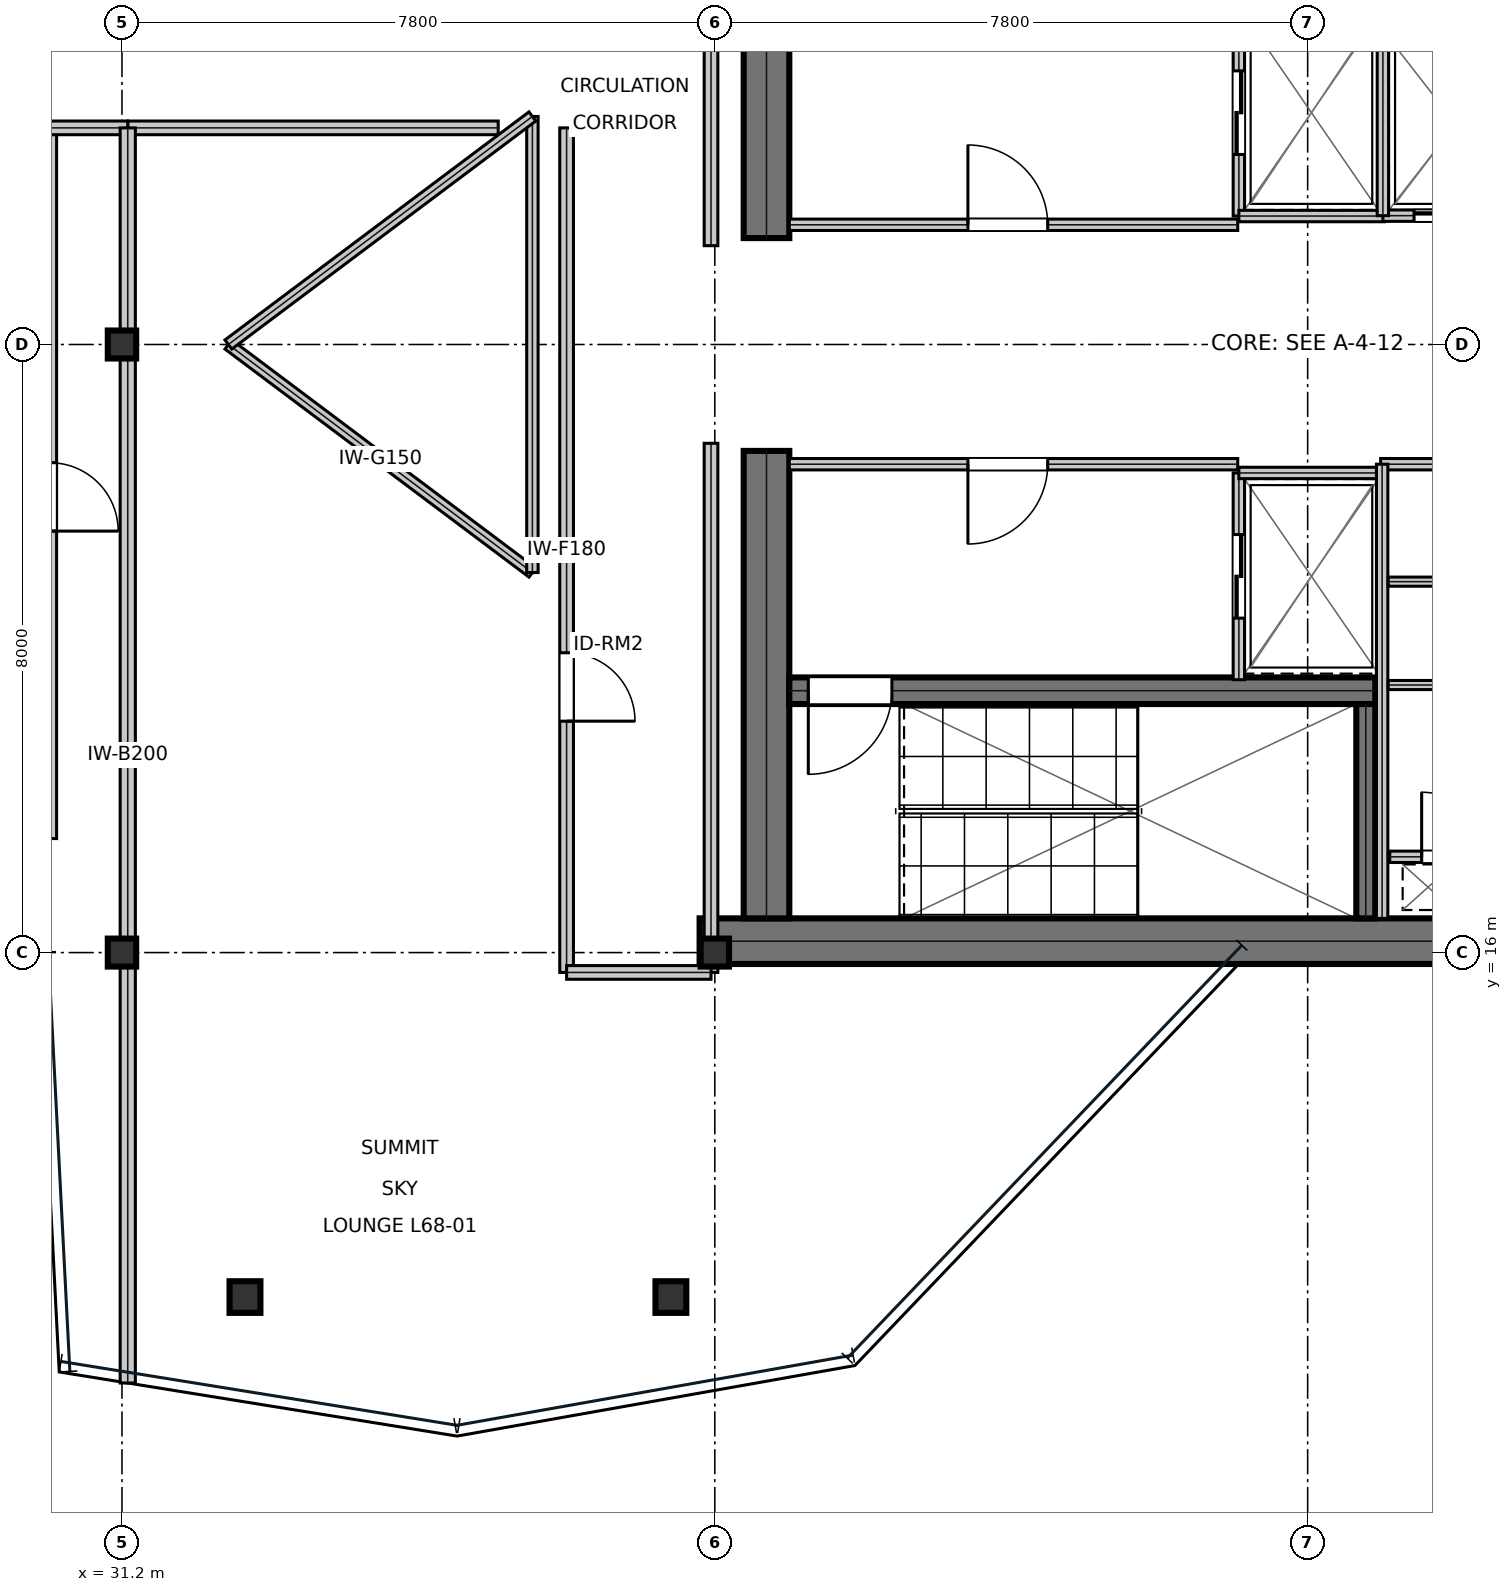
"""IFC4 building model, lengths in metres.
Left out: names, types, materials, properties, quantities, classifications, styles, units other than length and angle.
Written with IfcOpenShell. Run it as: python <this file> out.ifc"""

import sys

from ifc_helpers import new_model, si_unit, direction, frame, frame_2d, origin, origin_2d, place, context, subcontext, project, spatial, rectangle, i_section, extrude, element, fill, save


model = new_model("IFC4")
c1 = context("Model", 3, precision=1e-05, world=origin(), true_north=direction((0.0, 1.0)))
c2 = subcontext(c1, "Body", "Model", "MODEL_VIEW")
j1 = project(units=[si_unit("LENGTHUNIT", "METRE"), si_unit("PLANEANGLEUNIT", "RADIAN")], contexts=[c1])
p1 = place(None, origin())
s1 = spatial("IfcSite", under=j1, at=p1, CompositionType="ELEMENT")
p2 = place(p1, origin())
s2 = spatial("IfcBuilding", under=s1, at=p2, CompositionType="ELEMENT")
p3 = place(p2, frame((0.0, 0.0, 291.15)))
s3 = spatial("IfcBuildingStorey", under=s2, at=p3, CompositionType="ELEMENT", Elevation=291.15)
p4 = place(p3, frame((38.8, 16.15, 0.0), z_axis=(0.0, 0.0, 1.0), x_axis=(1.0, 0.0, 0.0)))
e1 = element("IfcWall", 1, at=p4, inside=s3, PredefinedType="SHEAR", context=c2, shape_type="SweptSolid", body=[
    extrude(rectangle(XDim=16.0, YDim=0.6, at=frame_2d((8.0, 0.0))), origin(), (0.0, 0.0, 1.0), 3.81),
])
for number, where, z_axis, x_axis in (
    (2, (39.68, 16.45, 0.0), (0.0, 0.0, 1.0), (0.0, 1.0, 0.0)),
    (3, (39.68, 25.4, 0.0), (0.0, 0.0, 1.0), (0.0, 1.0, 0.0)),
):
    element("IfcWall", number, at=place(p3, frame(where, z_axis=z_axis, x_axis=x_axis)), inside=s3, PredefinedType="SHEAR", context=c2, shape_type="SweptSolid", body=[
        extrude(rectangle(XDim=6.15, YDim=0.6, at=frame_2d((3.075, 0.0))), origin(), (0.0, 0.0, 1.0), 3.81),
    ])
p5 = place(p3, frame((39.98, 19.445, 0.0), z_axis=(0.0, 0.0, 1.0), x_axis=(1.0, 0.0, 0.0)))
e4 = element("IfcWall", 4, at=p5, inside=s3, PredefinedType="SHEAR", context=c2, shape_type="SweptSolid", body=[
    extrude(rectangle(XDim=7.71, YDim=0.35, at=frame_2d((3.855, 0.0))), origin(), (0.0, 0.0, 1.0), 3.81),
])
p6 = place(p5, frame((0.25, 0.0, 0.0)))
e5 = element("IfcOpeningElement", 5, at=p6, cuts=e4, PredefinedType="OPENING", context=c2, shape_type="SweptSolid", body=[
    extrude(rectangle(XDim=1.1, YDim=2.15, at=frame_2d((0.55, 1.075))), frame((0.0, 0.185, 0.0), z_axis=(0.0, -1.0, 0.0), x_axis=(1.0, 0.0, 0.0)), (0.0, 0.0, 1.0), 0.37),
])
p7 = place(p3, frame((47.565, 16.45, 0.0), z_axis=(0.0, 0.0, 1.0), x_axis=(0.0, 1.0, 0.0)))
e6 = element("IfcWall", 6, at=p7, inside=s3, PredefinedType="SHEAR", context=c2, shape_type="SweptSolid", body=[
    extrude(rectangle(XDim=2.82, YDim=0.25, at=frame_2d((1.41, 0.0))), origin(), (0.0, 0.0, 1.0), 3.81),
])
for number, where, z_axis, x_axis in (
    (7, (31.2, 16.0, 0.0), (0.0, 0.0, 1.0), (1.0, 0.0, 0.0)),
    (8, (31.2, 24.0, 0.0), (0.0, 0.0, 1.0), (1.0, 0.0, 0.0)),
    (9, (39.0, 16.0, 0.0), (0.0, 0.0, 1.0), (1.0, 0.0, 0.0)),
):
    element("IfcColumn", number, at=place(p3, frame(where, z_axis=z_axis, x_axis=x_axis)), inside=s3, PredefinedType="COLUMN", context=c2, shape_type="SweptSolid", body=[
        extrude(i_section(OverallWidth=0.373, OverallDepth=0.368, WebThickness=0.015, FlangeThickness=0.024, at=origin_2d()), origin(), (0.0, 0.0, 1.0), 4.044),
    ])
for number, where, z_axis, x_axis in (
    (10, (32.818, 11.468, 0.016), (0.0, 0.0, 1.0), (1.0, 0.0, 0.0)),
    (11, (38.422, 11.468, 0.016), (0.0, 0.0, 1.0), (1.0, 0.0, 0.0)),
):
    element("IfcColumn", number, at=place(p3, frame(where, z_axis=z_axis, x_axis=x_axis)), inside=s3, PredefinedType="COLUMN", context=c2, shape_type="SweptSolid", body=[
        extrude(i_section(OverallWidth=0.406, OverallDepth=0.416, WebThickness=0.03, FlangeThickness=0.048, at=origin_2d()), origin(), (0.0, 0.0, 1.0), 4.018),
    ])
p8 = place(p3, frame((39.98, 25.575, 0.0), z_axis=(0.0, 0.0, 1.0), x_axis=(1.0, 0.0, 0.0)))
e12 = element("IfcWall", 12, at=p8, inside=s3, PredefinedType="PARTITIONING", context=c2, shape_type="SweptSolid", body=[
    extrude(rectangle(XDim=5.9, YDim=0.15, at=frame_2d((2.95, 0.0))), origin(), (0.0, 0.0, 1.0), 3.81),
])
p9 = place(p8, frame((2.35, 0.0, 0.0)))
e13 = element("IfcOpeningElement", 13, at=p9, cuts=e12, PredefinedType="OPENING", context=c2, shape_type="SweptSolid", body=[
    extrude(rectangle(XDim=1.05, YDim=2.15, at=frame_2d((0.525, 1.075))), frame((0.0, 0.085, 0.0), z_axis=(0.0, -1.0, 0.0), x_axis=(1.0, 0.0, 0.0)), (0.0, 0.0, 1.0), 0.17),
])
p10 = place(p3, frame((39.98, 22.425, 0.0), z_axis=(0.0, 0.0, 1.0), x_axis=(1.0, 0.0, 0.0)))
e14 = element("IfcWall", 14, at=p10, inside=s3, PredefinedType="PARTITIONING", context=c2, shape_type="SweptSolid", body=[
    extrude(rectangle(XDim=5.9, YDim=0.15, at=frame_2d((2.95, 0.0))), origin(), (0.0, 0.0, 1.0), 3.81),
])
p11 = place(p10, frame((2.35, 0.0, 0.0)))
e15 = element("IfcOpeningElement", 15, at=p11, cuts=e14, PredefinedType="OPENING", context=c2, shape_type="SweptSolid", body=[
    extrude(rectangle(XDim=1.05, YDim=2.15, at=frame_2d((0.525, 1.075))), frame((0.0, 0.085, 0.0), z_axis=(0.0, -1.0, 0.0), x_axis=(1.0, 0.0, 0.0)), (0.0, 0.0, 1.0), 0.17),
])
p12 = place(p3, frame((45.895, 25.69, 0.0), z_axis=(0.0, 0.0, 1.0), x_axis=(0.0, 1.0, 0.0)))
e16 = element("IfcWall", 16, at=p12, inside=s3, PredefinedType="PARTITIONING", context=c2, shape_type="SweptSolid", body=[
    extrude(rectangle(XDim=2.72, YDim=0.15, at=frame_2d((1.36, 0.0))), origin(), (0.0, 0.0, 1.0), 3.81),
])
p13 = place(p12, frame((0.81, 0.0, 0.0)))
e17 = element("IfcOpeningElement", 17, at=p13, cuts=e16, PredefinedType="OPENING", context=c2, shape_type="SweptSolid", body=[
    extrude(rectangle(XDim=1.1, YDim=2.15, at=frame_2d((0.55, 1.075))), frame((0.0, 0.085, 0.0), z_axis=(0.0, -1.0, 0.0), x_axis=(1.0, 0.0, 0.0)), (0.0, 0.0, 1.0), 0.17),
])
p14 = place(p3, frame((45.895, 25.69, 0.0), z_axis=(0.0, 0.0, 1.0), x_axis=(1.0, 0.0, 0.0)))
e18 = element("IfcWall", 18, at=p14, inside=s3, PredefinedType="PARTITIONING", context=c2, shape_type="SweptSolid", body=[
    extrude(rectangle(XDim=1.915, YDim=0.15, at=frame_2d((0.958, 0.0))), origin(), (0.0, 0.0, 1.0), 3.81),
])
p15 = place(p3, frame((45.895, 19.59, 0.0), z_axis=(0.0, 0.0, 1.0), x_axis=(0.0, 1.0, 0.0)))
e19 = element("IfcWall", 19, at=p15, inside=s3, PredefinedType="PARTITIONING", context=c2, shape_type="SweptSolid", body=[
    extrude(rectangle(XDim=2.72, YDim=0.15, at=frame_2d((1.36, 0.0))), origin(), (0.0, 0.0, 1.0), 3.81),
])
p16 = place(p15, frame((0.81, 0.0, 0.0)))
e20 = element("IfcOpeningElement", 20, at=p16, cuts=e19, PredefinedType="OPENING", context=c2, shape_type="SweptSolid", body=[
    extrude(rectangle(XDim=1.1, YDim=2.15, at=frame_2d((0.55, 1.075))), frame((0.0, 0.085, 0.0), z_axis=(0.0, -1.0, 0.0), x_axis=(1.0, 0.0, 0.0)), (0.0, 0.0, 1.0), 0.17),
])
p17 = place(p3, frame((45.895, 22.31, 0.0), z_axis=(0.0, 0.0, 1.0), x_axis=(1.0, 0.0, 0.0)))
e21 = element("IfcWall", 21, at=p17, inside=s3, PredefinedType="PARTITIONING", context=c2, shape_type="SweptSolid", body=[
    extrude(rectangle(XDim=1.915, YDim=0.15, at=frame_2d((0.958, 0.0))), origin(), (0.0, 0.0, 1.0), 3.81),
])
p18 = place(p3, frame((47.79, 25.695, 0.0), z_axis=(0.0, 0.0, 1.0), x_axis=(1.0, 0.0, 0.0)))
e22 = element("IfcWall", 22, at=p18, inside=s3, PredefinedType="PARTITIONING", context=c2, shape_type="SweptSolid", body=[
    extrude(rectangle(XDim=1.92, YDim=0.15, at=frame_2d((0.96, 0.0))), origin(), (0.0, 0.0, 1.0), 3.81),
])
p19 = place(p18, frame((0.41, 0.0, 0.0)))
e23 = element("IfcOpeningElement", 23, at=p19, cuts=e22, PredefinedType="OPENING", context=c2, shape_type="SweptSolid", body=[
    extrude(rectangle(XDim=1.1, YDim=2.15, at=frame_2d((0.55, 1.075))), frame((0.0, 0.085, 0.0), z_axis=(0.0, -1.0, 0.0), x_axis=(1.0, 0.0, 0.0)), (0.0, 0.0, 1.0), 0.17),
])
p20 = place(p3, frame((47.79, 25.695, 0.0), z_axis=(0.0, 0.0, 1.0), x_axis=(0.0, 1.0, 0.0)))
e24 = element("IfcWall", 24, at=p20, inside=s3, PredefinedType="PARTITIONING", context=c2, shape_type="SweptSolid", body=[
    extrude(rectangle(XDim=2.415, YDim=0.15, at=frame_2d((1.208, 0.0))), origin(), (0.0, 0.0, 1.0), 3.81),
])
p21 = place(p3, frame((47.88, 17.26, 0.0), z_axis=(0.0, 0.0, 1.0), x_axis=(1.0, 0.0, 0.0)))
e25 = element("IfcWall", 25, at=p21, inside=s3, PredefinedType="PARTITIONING", context=c2, shape_type="SweptSolid", body=[
    extrude(rectangle(XDim=1.72, YDim=0.15, at=frame_2d((0.86, 0.0))), origin(), (0.0, 0.0, 1.0), 3.81),
])
p22 = place(p21, frame((0.42, 0.0, 0.0)))
e26 = element("IfcOpeningElement", 26, at=p22, cuts=e25, PredefinedType="OPENING", context=c2, shape_type="SweptSolid", body=[
    extrude(rectangle(XDim=0.85, YDim=2.15, at=frame_2d((0.425, 1.075))), frame((0.0, 0.085, 0.0), z_axis=(0.0, -1.0, 0.0), x_axis=(1.0, 0.0, 0.0)), (0.0, 0.0, 1.0), 0.17),
])
p23 = place(p3, frame((47.76, 22.425, 0.0), z_axis=(0.0, 0.0, 1.0), x_axis=(1.0, 0.0, 0.0)))
e27 = element("IfcWall", 27, at=p23, inside=s3, PredefinedType="PARTITIONING", context=c2, shape_type="SweptSolid", body=[
    extrude(rectangle(XDim=1.96, YDim=0.15, at=frame_2d((0.98, 0.0))), origin(), (0.0, 0.0, 1.0), 3.81),
])
p24 = place(p3, frame((47.78, 16.45, 0.0), z_axis=(0.0, 0.0, 1.0), x_axis=(0.0, 1.0, 0.0)))
e28 = element("IfcWall", 28, at=p24, inside=s3, PredefinedType="PARTITIONING", context=c2, shape_type="SweptSolid", body=[
    extrude(rectangle(XDim=5.975, YDim=0.15, at=frame_2d((2.988, 0.0))), origin(), (0.0, 0.0, 1.0), 3.81),
])
for number, where, z_axis, x_axis in (
    (29, (47.86, 19.52, 0.0), (0.0, 0.0, 1.0), (1.0, 0.0, 0.0)),
    (30, (47.86, 20.88, 0.0), (0.0, 0.0, 1.0), (1.0, 0.0, 0.0)),
):
    element("IfcWall", number, at=place(p3, frame(where, z_axis=z_axis, x_axis=x_axis)), inside=s3, PredefinedType="PARTITIONING", context=c2, shape_type="SweptSolid", body=[
        extrude(rectangle(XDim=1.76, YDim=0.12, at=frame_2d((0.88, 0.0))), origin(), (0.0, 0.0, 1.0), 3.81),
    ])
p25 = place(p3, frame((37.05, 15.739, 0.0), z_axis=(0.0, 0.0, 1.0), x_axis=(0.0, 1.0, 0.0)))
e31 = element("IfcWall", 31, at=p25, inside=s3, PredefinedType="SOLIDWALL", context=c2, shape_type="SweptSolid", body=[
    extrude(rectangle(XDim=11.111, YDim=0.18, at=frame_2d((5.556, 0.0))), origin(), (0.0, 0.0, 1.0), 3.27),
])
p26 = place(p25, frame((3.306, 0.0, 0.0)))
e32 = element("IfcOpeningElement", 32, at=p26, cuts=e31, PredefinedType="OPENING", context=c2, shape_type="SweptSolid", body=[
    extrude(rectangle(XDim=0.9, YDim=2.15, at=frame_2d((0.45, 1.075))), frame((0.0, 0.1, 0.0), z_axis=(0.0, -1.0, 0.0), x_axis=(1.0, 0.0, 0.0)), (0.0, 0.0, 1.0), 0.2),
])
p27 = place(p3, frame((30.25, 17.5, 0.0), z_axis=(0.0, 0.0, 1.0), x_axis=(0.0, 1.0, 0.0)))
e33 = element("IfcWall", 33, at=p27, inside=s3, PredefinedType="SOLIDWALL", context=c2, shape_type="SweptSolid", body=[
    extrude(rectangle(XDim=9.35, YDim=0.18, at=frame_2d((4.675, 0.0))), origin(), (0.0, 0.0, 1.0), 3.27),
])
p28 = place(p27, frame((4.045, 0.0, 0.0)))
e34 = element("IfcOpeningElement", 34, at=p28, cuts=e33, PredefinedType="OPENING", context=c2, shape_type="SweptSolid", body=[
    extrude(rectangle(XDim=0.9, YDim=2.15, at=frame_2d((0.45, 1.075))), frame((0.0, 0.1, 0.0), z_axis=(0.0, -1.0, 0.0), x_axis=(1.0, 0.0, 0.0)), (0.0, 0.0, 1.0), 0.2),
])
p29 = place(p3, frame((38.95, 15.739, 0.0), z_axis=(0.0, 0.0, 1.0), x_axis=(0.0, 1.0, 0.0)))
e35 = element("IfcWall", 35, at=p29, inside=s3, PredefinedType="SOLIDWALL", context=c2, shape_type="SweptSolid", body=[
    extrude(rectangle(XDim=6.961, YDim=0.18, at=frame_2d((3.48, 0.0))), origin(), (0.0, 0.0, 1.0), 3.27),
])
p30 = place(p3, frame((31.276, 26.85, 0.0), z_axis=(0.0, 0.0, 1.0), x_axis=(1.0, 0.0, 0.0)))
e36 = element("IfcWall", 36, at=p30, inside=s3, PredefinedType="SOLIDWALL", context=c2, shape_type="SweptSolid", body=[
    extrude(rectangle(XDim=4.874, YDim=0.18, at=frame_2d((2.437, 0.0))), origin(), (0.0, 0.0, 1.0), 3.81),
])
p31 = place(p3, frame((37.05, 15.739, 0.0), z_axis=(0.0, 0.0, 1.0), x_axis=(1.0, 0.0, 0.0)))
e37 = element("IfcWall", 37, at=p31, inside=s3, PredefinedType="SOLIDWALL", context=c2, shape_type="SweptSolid", body=[
    extrude(rectangle(XDim=1.9, YDim=0.18, at=frame_2d((0.95, 0.0))), origin(), (0.0, 0.0, 1.0), 3.27),
])
p32 = place(p3, frame((30.25, 26.85, 0.0), z_axis=(0.0, 0.0, 1.0), x_axis=(1.0, 0.0, 0.0)))
e38 = element("IfcWall", 38, at=p32, inside=s3, PredefinedType="SOLIDWALL", context=c2, shape_type="SweptSolid", body=[
    extrude(rectangle(XDim=1.026, YDim=0.18, at=frame_2d((0.513, 0.0))), origin(), (0.0, 0.0, 1.0), 3.27),
])
p33 = place(p3, frame((38.95, 25.3, 0.0), z_axis=(0.0, 0.0, 1.0), x_axis=(0.0, 1.0, 0.0)))
e39 = element("IfcWall", 39, at=p33, inside=s3, PredefinedType="SOLIDWALL", context=c2, shape_type="SweptSolid", body=[
    extrude(rectangle(XDim=6.961, YDim=0.18, at=frame_2d((3.48, 0.0))), origin(), (0.0, 0.0, 1.0), 3.27),
])
p34 = place(p3, frame((31.276, 10.337, 0.0), z_axis=(0.0, 0.0, 1.0), x_axis=(0.0, 1.0, 0.0)))
e40 = element("IfcWall", 40, at=p34, inside=s3, PredefinedType="SOLIDWALL", context=c2, shape_type="SweptSolid", body=[
    extrude(rectangle(XDim=16.513, YDim=0.2, at=frame_2d((8.256, 0.0))), origin(), (0.0, 0.0, 1.0), 3.27),
])
p35 = place(p3, frame((32.6, 24.0, 0.0), z_axis=(0.0, 0.0, 1.0), x_axis=(0.8, -0.6, 0.0)))
e41 = element("IfcWall", 41, at=p35, inside=s3, PredefinedType="MOVABLE", context=c2, shape_type="SweptSolid", body=[
    extrude(rectangle(XDim=5.0, YDim=0.15, at=frame_2d((2.5, 0.0))), origin(), (0.0, 0.0, 1.0), 3.81),
])
p36 = place(p3, frame((36.6, 21.0, 0.0), z_axis=(0.0, 0.0, 1.0), x_axis=(0.0, 1.0, 0.0)))
e42 = element("IfcWall", 42, at=p36, inside=s3, PredefinedType="MOVABLE", context=c2, shape_type="SweptSolid", body=[
    extrude(rectangle(XDim=6.0, YDim=0.15, at=frame_2d((3.0, 0.0))), origin(), (0.0, 0.0, 1.0), 3.81),
])
p37 = place(p3, frame((36.6, 27.0, 0.0), z_axis=(0.0, 0.0, 1.0), x_axis=(-0.8, -0.6, 0.0)))
e43 = element("IfcWall", 43, at=p37, inside=s3, PredefinedType="MOVABLE", context=c2, shape_type="SweptSolid", body=[
    extrude(rectangle(XDim=5.0, YDim=0.15, at=frame_2d((2.5, 0.0))), origin(), (0.0, 0.0, 1.0), 3.81),
])
p38 = place(p9, origin())
e44 = element("IfcDoor", 44, at=p38, inside=s3, OperationType="SINGLE_SWING_LEFT", PredefinedType="DOOR", context=c2, shape_type="SweptSolid", body=[
    extrude(rectangle(XDim=1.05, YDim=2.15, at=frame_2d((0.525, 1.075))), frame((0.0, 0.025, 0.0), z_axis=(0.0, -1.0, 0.0), x_axis=(1.0, 0.0, 0.0)), (0.0, 0.0, 1.0), 0.05),
])
fill(e13, e44)
p39 = place(p11, frame((1.05, 0.0, 0.0), z_axis=(0.0, 0.0, 1.0), x_axis=(-1.0, 0.0, 0.0)))
e45 = element("IfcDoor", 45, at=p39, inside=s3, OperationType="SINGLE_SWING_RIGHT", PredefinedType="DOOR", context=c2, shape_type="SweptSolid", body=[
    extrude(rectangle(XDim=1.05, YDim=2.15, at=frame_2d((0.525, 1.075))), frame((0.0, 0.025, 0.0), z_axis=(0.0, -1.0, 0.0), x_axis=(1.0, 0.0, 0.0)), (0.0, 0.0, 1.0), 0.05),
])
fill(e15, e45)
p40 = place(p13, frame((1.1, 0.0, 0.0), z_axis=(0.0, 0.0, 1.0), x_axis=(-1.0, 0.0, 0.0)))
e46 = element("IfcDoor", 46, at=p40, inside=s3, OperationType="DOUBLE_DOOR_SLIDING", PredefinedType="DOOR", context=c2, shape_type="SweptSolid", body=[
    extrude(rectangle(XDim=1.1, YDim=2.15, at=frame_2d((0.55, 1.075))), frame((0.0, 0.025, 0.0), z_axis=(0.0, -1.0, 0.0), x_axis=(1.0, 0.0, 0.0)), (0.0, 0.0, 1.0), 0.05),
])
fill(e17, e46)
p41 = place(p16, frame((1.1, 0.0, 0.0), z_axis=(0.0, 0.0, 1.0), x_axis=(-1.0, 0.0, 0.0)))
e47 = element("IfcDoor", 47, at=p41, inside=s3, OperationType="DOUBLE_DOOR_SLIDING", PredefinedType="DOOR", context=c2, shape_type="SweptSolid", body=[
    extrude(rectangle(XDim=1.1, YDim=2.15, at=frame_2d((0.55, 1.075))), frame((0.0, 0.025, 0.0), z_axis=(0.0, -1.0, 0.0), x_axis=(1.0, 0.0, 0.0)), (0.0, 0.0, 1.0), 0.05),
])
fill(e20, e47)
p42 = place(p19, frame((1.1, 0.0, 0.0), z_axis=(0.0, 0.0, 1.0), x_axis=(-1.0, 0.0, 0.0)))
e48 = element("IfcDoor", 48, at=p42, inside=s3, OperationType="DOUBLE_DOOR_SLIDING", PredefinedType="DOOR", context=c2, shape_type="SweptSolid", body=[
    extrude(rectangle(XDim=1.1, YDim=2.15, at=frame_2d((0.55, 1.075))), frame((0.0, 0.025, 0.0), z_axis=(0.0, -1.0, 0.0), x_axis=(1.0, 0.0, 0.0)), (0.0, 0.0, 1.0), 0.05),
])
fill(e23, e48)
p43 = place(p22, origin())
e49 = element("IfcDoor", 49, at=p43, inside=s3, OperationType="SINGLE_SWING_LEFT", PredefinedType="TRAPDOOR", context=c2, shape_type="SweptSolid", body=[
    extrude(rectangle(XDim=0.85, YDim=2.15, at=frame_2d((0.425, 1.075))), frame((0.0, 0.025, 0.0), z_axis=(0.0, -1.0, 0.0), x_axis=(1.0, 0.0, 0.0)), (0.0, 0.0, 1.0), 0.05),
])
fill(e26, e49)
p44 = place(p26, frame((0.9, 0.0, 0.0), z_axis=(0.0, 0.0, 1.0), x_axis=(-1.0, 0.0, 0.0)))
e50 = element("IfcDoor", 50, at=p44, inside=s3, OperationType="SINGLE_SWING_RIGHT", PredefinedType="DOOR", context=c2, shape_type="SweptSolid", body=[
    extrude(rectangle(XDim=0.9, YDim=2.15, at=frame_2d((0.45, 1.075))), frame((0.0, 0.025, 0.0), z_axis=(0.0, -1.0, 0.0), x_axis=(1.0, 0.0, 0.0)), (0.0, 0.0, 1.0), 0.05),
])
fill(e32, e50)
p45 = place(p6, frame((1.1, 0.0, 0.0), z_axis=(0.0, 0.0, 1.0), x_axis=(-1.0, 0.0, 0.0)))
e51 = element("IfcDoor", 51, at=p45, inside=s3, OperationType="SINGLE_SWING_RIGHT", PredefinedType="DOOR", context=c2, shape_type="SweptSolid", body=[
    extrude(rectangle(XDim=1.1, YDim=2.15, at=frame_2d((0.55, 1.075))), frame((0.0, 0.025, 0.0), z_axis=(0.0, -1.0, 0.0), x_axis=(1.0, 0.0, 0.0)), (0.0, 0.0, 1.0), 0.05),
])
fill(e5, e51)
save(model, sys.argv[1])
